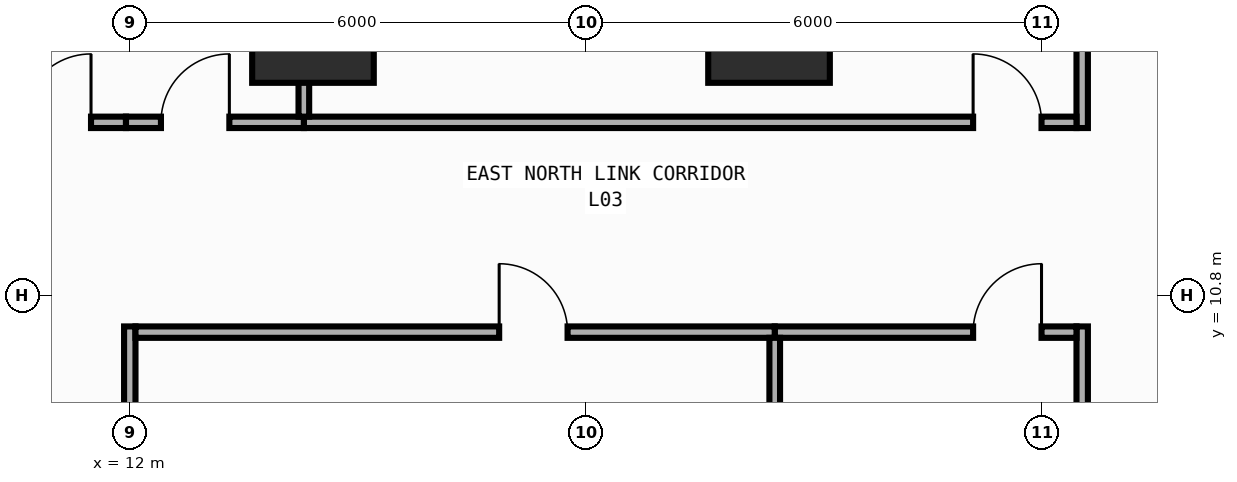
"""IFC4 building model, lengths in metres.
Left out: names, types, materials, properties, quantities, classifications, styles, units other than length and angle.
Written with IfcOpenShell. Run it as: python <this file> out.ifc"""

import sys

from ifc_helpers import new_model, si_unit, direction, frame, frame_2d, origin, origin_2d, place, context, subcontext, project, spatial, rectangle, extrude, element, fill, save


model = new_model("IFC4")
c1 = context("Model", 3, precision=1e-05, world=origin(), true_north=direction((0.0, 1.0)))
c2 = subcontext(c1, "Body", "Model", "MODEL_VIEW")
j1 = project(units=[si_unit("LENGTHUNIT", "METRE"), si_unit("PLANEANGLEUNIT", "RADIAN")], contexts=[c1])
p1 = place(None, origin())
s1 = spatial("IfcSite", under=j1, at=p1, CompositionType="ELEMENT")
p2 = place(p1, origin())
s2 = spatial("IfcBuilding", under=s1, at=p2, CompositionType="ELEMENT")
p3 = place(p2, frame((0.0, 0.0, 11.0)))
s3 = spatial("IfcBuildingStorey", under=s2, at=p3, CompositionType="ELEMENT", Elevation=11.0)
for number, where, z_axis, x_axis in (
    (1, (20.4, 14.4, 0.0), (0.0, 0.0, 1.0), (1.0, 0.0, 0.0)),
    (2, (14.4, 14.4, 0.0), (0.0, 0.0, 1.0), (1.0, 0.0, 0.0)),
):
    element("IfcColumn", number, at=place(p3, frame(where, z_axis=z_axis, x_axis=x_axis)), inside=s3, PredefinedType="COLUMN", context=c2, shape_type="SweptSolid", body=[
        extrude(rectangle(XDim=1.6, YDim=1.6, at=origin_2d()), origin(), (0.0, 0.0, 1.0), 5.0),
    ])
p4 = place(p3, frame((11.99, 7.2, 0.0), z_axis=(0.0, 0.0, 1.0), x_axis=(0.0, 1.0, 0.0)))
e3 = element("IfcWall", 3, at=p4, inside=s3, PredefinedType="PARTITIONING", context=c2, shape_type="SweptSolid", body=[
    extrude(rectangle(XDim=3.195, YDim=0.15, at=frame_2d((1.598, 0.0))), origin(), (0.0, 0.0, 1.0), 4.7),
])
p5 = place(p4, frame((0.689, 0.0, 0.0)))
e4 = element("IfcOpeningElement", 4, at=p5, cuts=e3, PredefinedType="OPENING", context=c2, shape_type="SweptSolid", body=[
    extrude(rectangle(XDim=0.9, YDim=2.15, at=frame_2d((0.45, 1.075))), frame((0.0, 0.085, 0.0), z_axis=(0.0, -1.0, 0.0), x_axis=(1.0, 0.0, 0.0)), (0.0, 0.0, 1.0), 0.17),
])
p6 = place(p3, frame((8.205, 13.08, 0.0), z_axis=(0.0, 0.0, 1.0), x_axis=(1.0, 0.0, 0.0)))
e5 = element("IfcWall", 5, at=p6, inside=s3, PredefinedType="PARTITIONING", context=c2, shape_type="SweptSolid", body=[
    extrude(rectangle(XDim=3.735, YDim=0.15, at=frame_2d((1.867, 0.0))), origin(), (0.0, 0.0, 1.0), 4.7),
])
p7 = place(p6, frame((2.375, 0.0, 0.0)))
e6 = element("IfcOpeningElement", 6, at=p7, cuts=e5, PredefinedType="OPENING", context=c2, shape_type="SweptSolid", body=[
    extrude(rectangle(XDim=0.9, YDim=2.15, at=frame_2d((0.45, 1.075))), frame((0.0, 0.085, 0.0), z_axis=(0.0, -1.0, 0.0), x_axis=(1.0, 0.0, 0.0)), (0.0, 0.0, 1.0), 0.17),
])
p8 = place(p3, frame((24.52, 13.005, 0.0), z_axis=(0.0, 0.0, 1.0), x_axis=(0.0, 1.0, 0.0)))
e7 = element("IfcWall", 7, at=p8, inside=s3, PredefinedType="PARTITIONING", context=c2, shape_type="SweptSolid", body=[
    extrude(rectangle(XDim=14.253, YDim=0.15, at=frame_2d((7.126, 0.0))), origin(), (0.0, 0.0, 1.0), 4.7),
])
p9 = place(p8, frame((5.874, 0.0, 0.0)))
e8 = element("IfcOpeningElement", 8, at=p9, cuts=e7, PredefinedType="OPENING", context=c2, shape_type="SweptSolid", body=[
    extrude(rectangle(XDim=0.9, YDim=2.15, at=frame_2d((0.45, 1.075))), frame((0.0, 0.085, 0.0), z_axis=(0.0, -1.0, 0.0), x_axis=(1.0, 0.0, 0.0)), (0.0, 0.0, 1.0), 0.17),
])
p10 = place(p3, frame((24.52, -20.88, 0.0), z_axis=(0.0, 0.0, 1.0), x_axis=(0.0, 1.0, 0.0)))
e9 = element("IfcWall", 9, at=p10, inside=s3, PredefinedType="PARTITIONING", context=c2, shape_type="SweptSolid", body=[
    extrude(rectangle(XDim=31.275, YDim=0.15, at=frame_2d((15.637, 0.0))), origin(), (0.0, 0.0, 1.0), 4.7),
])
p11 = place(p10, frame((15.087, 0.0, 0.0)))
e10 = element("IfcOpeningElement", 10, at=p11, cuts=e9, PredefinedType="OPENING", context=c2, shape_type="SweptSolid", body=[
    extrude(rectangle(XDim=0.9, YDim=2.15, at=frame_2d((0.45, 1.075))), frame((0.0, 0.085, 0.0), z_axis=(0.0, -1.0, 0.0), x_axis=(1.0, 0.0, 0.0)), (0.0, 0.0, 1.0), 0.17),
])
p12 = place(p3, frame((14.28, 13.08, 0.0), z_axis=(0.0, 0.0, 1.0), x_axis=(1.0, 0.0, 0.0)))
e11 = element("IfcWall", 11, at=p12, inside=s3, PredefinedType="PARTITIONING", context=c2, shape_type="SweptSolid", body=[
    extrude(rectangle(XDim=10.165, YDim=0.15, at=frame_2d((5.083, 0.0))), origin(), (0.0, 0.0, 1.0), 4.7),
])
p13 = place(p12, frame((8.805, 0.0, 0.0)))
e12 = element("IfcOpeningElement", 12, at=p13, cuts=e11, PredefinedType="OPENING", context=c2, shape_type="SweptSolid", body=[
    extrude(rectangle(XDim=0.9, YDim=2.15, at=frame_2d((0.45, 1.075))), frame((0.0, 0.085, 0.0), z_axis=(0.0, -1.0, 0.0), x_axis=(1.0, 0.0, 0.0)), (0.0, 0.0, 1.0), 0.17),
])
p14 = place(p3, frame((20.475, 10.32, 0.0), z_axis=(0.0, 0.0, 1.0), x_axis=(1.0, 0.0, 0.0)))
e13 = element("IfcWall", 13, at=p14, inside=s3, PredefinedType="PARTITIONING", context=c2, shape_type="SweptSolid", body=[
    extrude(rectangle(XDim=3.97, YDim=0.15, at=frame_2d((1.985, 0.0))), origin(), (0.0, 0.0, 1.0), 4.7),
])
p15 = place(p14, frame((2.61, 0.0, 0.0)))
e14 = element("IfcOpeningElement", 14, at=p15, cuts=e13, PredefinedType="OPENING", context=c2, shape_type="SweptSolid", body=[
    extrude(rectangle(XDim=0.9, YDim=2.15, at=frame_2d((0.45, 1.075))), frame((0.0, 0.085, 0.0), z_axis=(0.0, -1.0, 0.0), x_axis=(1.0, 0.0, 0.0)), (0.0, 0.0, 1.0), 0.17),
])
p16 = place(p3, frame((12.065, 10.32, 0.0), z_axis=(0.0, 0.0, 1.0), x_axis=(1.0, 0.0, 0.0)))
e15 = element("IfcWall", 15, at=p16, inside=s3, PredefinedType="PARTITIONING", context=c2, shape_type="SweptSolid", body=[
    extrude(rectangle(XDim=8.41, YDim=0.15, at=frame_2d((4.205, 0.0))), origin(), (0.0, 0.0, 1.0), 4.7),
])
p17 = place(p16, frame((4.785, 0.0, 0.0)))
e16 = element("IfcOpeningElement", 16, at=p17, cuts=e15, PredefinedType="OPENING", context=c2, shape_type="SweptSolid", body=[
    extrude(rectangle(XDim=0.9, YDim=2.15, at=frame_2d((0.45, 1.075))), frame((0.0, 0.085, 0.0), z_axis=(0.0, -1.0, 0.0), x_axis=(1.0, 0.0, 0.0)), (0.0, 0.0, 1.0), 0.17),
])
p18 = place(p3, frame((11.94, 13.08, 0.0), z_axis=(0.0, 0.0, 1.0), x_axis=(1.0, 0.0, 0.0)))
e17 = element("IfcWall", 17, at=p18, inside=s3, PredefinedType="PARTITIONING", context=c2, shape_type="SweptSolid", body=[
    extrude(rectangle(XDim=2.34, YDim=0.15, at=frame_2d((1.17, 0.0))), origin(), (0.0, 0.0, 1.0), 4.7),
])
p19 = place(p18, frame((0.46, 0.0, 0.0)))
e18 = element("IfcOpeningElement", 18, at=p19, cuts=e17, PredefinedType="OPENING", context=c2, shape_type="SweptSolid", body=[
    extrude(rectangle(XDim=0.9, YDim=2.15, at=frame_2d((0.45, 1.075))), frame((0.0, 0.085, 0.0), z_axis=(0.0, -1.0, 0.0), x_axis=(1.0, 0.0, 0.0)), (0.0, 0.0, 1.0), 0.17),
])
p20 = place(p3, frame((14.28, 13.155, 0.0), z_axis=(0.0, 0.0, 1.0), x_axis=(0.0, 1.0, 0.0)))
e19 = element("IfcWall", 19, at=p20, inside=s3, PredefinedType="PARTITIONING", context=c2, shape_type="SweptSolid", body=[
    extrude(rectangle(XDim=14.135, YDim=0.14, at=frame_2d((7.067, 0.0))), origin(), (0.0, 0.0, 1.0), 3.8),
])
p21 = place(p3, frame((20.475, 7.2, 0.0), z_axis=(0.0, 0.0, 1.0), x_axis=(0.0, 1.0, 0.0)))
e20 = element("IfcWall", 20, at=p21, inside=s3, PredefinedType="PARTITIONING", context=c2, shape_type="SweptSolid", body=[
    extrude(rectangle(XDim=3.045, YDim=0.14, at=frame_2d((1.522, 0.0))), origin(), (0.0, 0.0, 1.0), 4.7),
])
p22 = place(p7, origin())
e21 = element("IfcDoor", 21, at=p22, inside=s3, OperationType="SINGLE_SWING_RIGHT", PredefinedType="DOOR", context=c2, shape_type="SweptSolid", body=[
    extrude(rectangle(XDim=0.9, YDim=2.15, at=frame_2d((0.45, 1.075))), frame((0.0, 0.025, 0.0), z_axis=(0.0, -1.0, 0.0), x_axis=(1.0, 0.0, 0.0)), (0.0, 0.0, 1.0), 0.05),
])
fill(e6, e21)
p23 = place(p13, origin())
e22 = element("IfcDoor", 22, at=p23, inside=s3, OperationType="SINGLE_SWING_LEFT", PredefinedType="DOOR", context=c2, shape_type="SweptSolid", body=[
    extrude(rectangle(XDim=0.9, YDim=2.15, at=frame_2d((0.45, 1.075))), frame((0.0, 0.025, 0.0), z_axis=(0.0, -1.0, 0.0), x_axis=(1.0, 0.0, 0.0)), (0.0, 0.0, 1.0), 0.05),
])
fill(e12, e22)
p24 = place(p15, origin())
e23 = element("IfcDoor", 23, at=p24, inside=s3, OperationType="SINGLE_SWING_RIGHT", PredefinedType="DOOR", context=c2, shape_type="SweptSolid", body=[
    extrude(rectangle(XDim=0.9, YDim=2.15, at=frame_2d((0.45, 1.075))), frame((0.0, 0.025, 0.0), z_axis=(0.0, -1.0, 0.0), x_axis=(1.0, 0.0, 0.0)), (0.0, 0.0, 1.0), 0.05),
])
fill(e14, e23)
p25 = place(p17, origin())
e24 = element("IfcDoor", 24, at=p25, inside=s3, OperationType="SINGLE_SWING_LEFT", PredefinedType="DOOR", context=c2, shape_type="SweptSolid", body=[
    extrude(rectangle(XDim=0.9, YDim=2.15, at=frame_2d((0.45, 1.075))), frame((0.0, 0.025, 0.0), z_axis=(0.0, -1.0, 0.0), x_axis=(1.0, 0.0, 0.0)), (0.0, 0.0, 1.0), 0.05),
])
fill(e16, e24)
p26 = place(p19, origin())
e25 = element("IfcDoor", 25, at=p26, inside=s3, OperationType="SINGLE_SWING_RIGHT", PredefinedType="DOOR", context=c2, shape_type="SweptSolid", body=[
    extrude(rectangle(XDim=0.9, YDim=2.15, at=frame_2d((0.45, 1.075))), frame((0.0, 0.025, 0.0), z_axis=(0.0, -1.0, 0.0), x_axis=(1.0, 0.0, 0.0)), (0.0, 0.0, 1.0), 0.05),
])
fill(e18, e25)
save(model, sys.argv[1])
